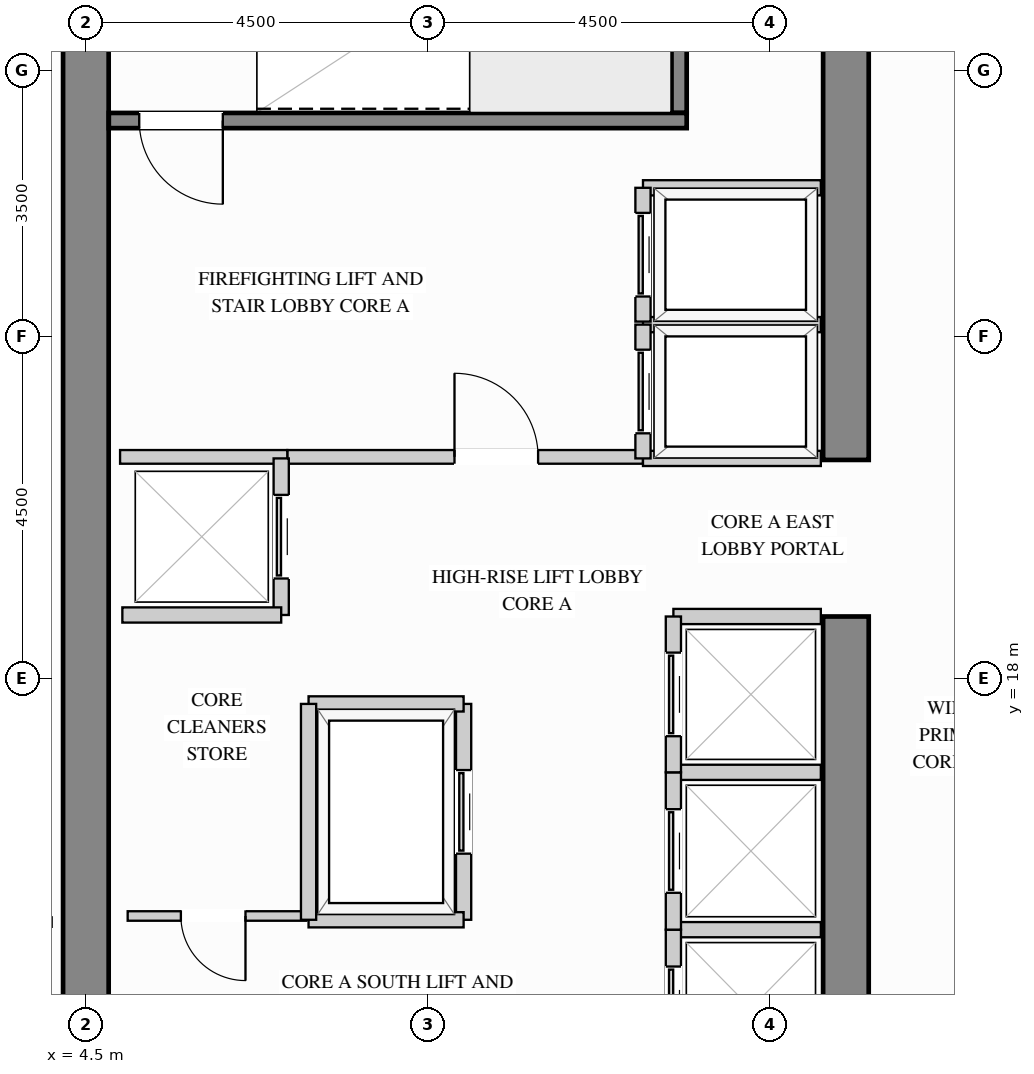
"""IFC4 building model, lengths in metres.
Left out: names, types, materials, properties, quantities, classifications, styles, units other than length and angle.
Written with IfcOpenShell. Run it as: python <this file> out.ifc"""

import sys

from ifc_helpers import new_model, si_unit, direction, frame, frame_2d, origin, place, context, subcontext, project, spatial, rectangle, extrude, source, transform, mapped, element, fill, save


model = new_model("IFC4")
c1 = context("Model", 3, precision=1e-05, world=origin(), true_north=direction((0.0, 1.0)))
c2 = subcontext(c1, "Body", "Model", "MODEL_VIEW")
j1 = project(units=[si_unit("LENGTHUNIT", "METRE"), si_unit("PLANEANGLEUNIT", "RADIAN")], contexts=[c1])
p1 = place(None, origin())
s1 = spatial("IfcSite", under=j1, at=p1, CompositionType="ELEMENT")
p2 = place(p1, origin())
s2 = spatial("IfcBuilding", under=s1, at=p2, CompositionType="ELEMENT")
p3 = place(p2, frame((0.0, 0.0, 200.7)))
s3 = spatial("IfcBuildingStorey", under=s2, at=p3, CompositionType="ELEMENT", Elevation=200.7)
m1 = source(origin(), c2, "Body", "SweptSolid", [
    extrude(rectangle(XDim=10.02, YDim=0.6, at=frame_2d((5.01, 0.0))), origin(), (0.0, 0.0, 1.0), 3.4),
])
p4 = place(p3, frame((14.5, 8.8, 0.0), z_axis=(0.0, 0.0, 1.0), x_axis=(0.0, 1.0, 0.0)))
e1 = element("IfcWall", 1, at=p4, inside=s3, PredefinedType="SHEAR", context=c2, shape_type="MappedRepresentation", body=[
    mapped(m1, transform((0.0, 0.0, 0.0), x_axis=(1.0, 0.0, 0.0), y_axis=(0.0, 1.0, 0.0), z_axis=(0.0, 0.0, 1.0))),
])
m2 = source(origin(), c2, "Body", "SweptSolid", [
    extrude(rectangle(XDim=8.32, YDim=0.6, at=frame_2d((4.16, 0.0))), origin(), (0.0, 0.0, 1.0), 3.4),
])
p5 = place(p3, frame((14.5, 20.88, 0.0), z_axis=(0.0, 0.0, 1.0), x_axis=(0.0, 1.0, 0.0)))
e2 = element("IfcWall", 2, at=p5, inside=s3, PredefinedType="SHEAR", context=c2, shape_type="MappedRepresentation", body=[
    mapped(m2, transform((0.0, 0.0, 0.0), x_axis=(1.0, 0.0, 0.0), y_axis=(0.0, 1.0, 0.0), z_axis=(0.0, 0.0, 1.0))),
])
m3 = source(origin(), c2, "Body", "SweptSolid", [
    extrude(rectangle(XDim=20.4, YDim=0.6, at=frame_2d((10.2, 0.0))), origin(), (0.0, 0.0, 1.0), 3.4),
])
p6 = place(p3, frame((4.5, 8.8, 0.0), z_axis=(0.0, 0.0, 1.0), x_axis=(0.0, 1.0, 0.0)))
e3 = element("IfcWall", 3, at=p6, inside=s3, PredefinedType="SHEAR", context=c2, shape_type="MappedRepresentation", body=[
    mapped(m3, transform((0.0, 0.0, 0.0), x_axis=(1.0, 0.0, 0.0), y_axis=(0.0, 1.0, 0.0), z_axis=(0.0, 0.0, 1.0))),
])
p7 = place(p3, frame((7.15, 20.92, 0.0), z_axis=(0.0, 0.0, 1.0), x_axis=(1.0, 0.0, 0.0)))
e4 = element("IfcWall", 4, at=p7, inside=s3, PredefinedType="PARTITIONING", context=c2, shape_type="SweptSolid", body=[
    extrude(rectangle(XDim=4.68, YDim=0.18, at=frame_2d((2.34, 0.0))), origin(), (0.0, 0.0, 1.0), 3.385),
])
p8 = place(p7, frame((2.2, 0.0, 0.0)))
e5 = element("IfcOpeningElement", 5, at=p8, cuts=e4, PredefinedType="OPENING", context=c2, shape_type="SweptSolid", body=[
    extrude(rectangle(XDim=1.1, YDim=2.15, at=frame_2d((0.55, 1.075))), frame((0.0, 0.1, 0.0), z_axis=(0.0, -1.0, 0.0), x_axis=(1.0, 0.0, 0.0)), (0.0, 0.0, 1.0), 0.2),
])
m4 = source(origin(), c2, "Body", "SweptSolid", [
    extrude(rectangle(XDim=2.2, YDim=0.18, at=frame_2d((1.1, 0.0))), origin(), (0.0, 0.0, 1.0), 3.385),
])
p9 = place(p3, frame((4.95, 20.92, 0.0), z_axis=(0.0, 0.0, 1.0), x_axis=(1.0, 0.0, 0.0)))
e6 = element("IfcWall", 6, at=p9, inside=s3, PredefinedType="PARTITIONING", context=c2, shape_type="MappedRepresentation", body=[
    mapped(m4, transform((0.0, 0.0, 0.0), x_axis=(1.0, 0.0, 0.0), y_axis=(0.0, 1.0, 0.0), z_axis=(0.0, 0.0, 1.0))),
])
p10 = place(p3, frame((5.05, 14.88, 0.0), z_axis=(0.0, 0.0, 1.0), x_axis=(1.0, 0.0, 0.0)))
e7 = element("IfcWall", 7, at=p10, inside=s3, PredefinedType="PARTITIONING", context=c2, shape_type="SweptSolid", body=[
    extrude(rectangle(XDim=2.35, YDim=0.125, at=frame_2d((1.175, 0.0))), origin(), (0.0, 0.0, 1.0), 3.385),
])
p11 = place(p10, frame((0.7, 0.0, 0.0)))
e8 = element("IfcOpeningElement", 8, at=p11, cuts=e7, PredefinedType="OPENING", context=c2, shape_type="SweptSolid", body=[
    extrude(rectangle(XDim=0.85, YDim=2.1, at=frame_2d((0.425, 1.05))), frame((0.0, 0.073, 0.0), z_axis=(0.0, -1.0, 0.0), x_axis=(1.0, 0.0, 0.0)), (0.0, 0.0, 1.0), 0.145),
])
m5 = source(origin(), c2, "Body", "SweptSolid", [
    extrude(rectangle(XDim=3.698, YDim=0.125, at=frame_2d((1.849, 0.0))), origin(), (0.0, 0.0, 1.0), 3.385),
])
p12 = place(p3, frame((0.352, 14.8, 0.0), z_axis=(0.0, 0.0, 1.0), x_axis=(1.0, 0.0, 0.0)))
e9 = element("IfcWall", 9, at=p12, inside=s3, PredefinedType="PARTITIONING", context=c2, shape_type="MappedRepresentation", body=[
    mapped(m5, transform((0.0, 0.0, 0.0), x_axis=(1.0, 0.0, 0.0), y_axis=(0.0, 1.0, 0.0), z_axis=(0.0, 0.0, 1.0))),
])
m6 = source(origin(), c2, "Body", "SweptSolid", [
    extrude(rectangle(XDim=2.34, YDim=0.2, at=frame_2d((1.17, 0.0))), origin(), (0.0, 0.0, 1.0), 3.385),
])
for number, where, z_axis, x_axis in (
    (10, (11.83, 22.66, 0.0), (0.0, 0.0, 1.0), (1.0, 0.0, 0.0)),
    (11, (11.83, 20.9, 0.0), (0.0, 0.0, 1.0), (1.0, 0.0, 0.0)),
):
    element("IfcWall", number, at=place(p3, frame(where, z_axis=z_axis, x_axis=x_axis)), inside=s3, PredefinedType="PARTITIONING", context=c2, shape_type="MappedRepresentation", body=[
        mapped(m6, transform((0.0, 0.0, 0.0), x_axis=(1.0, 0.0, 0.0), y_axis=(0.0, 1.0, 0.0), z_axis=(0.0, 0.0, 1.0))),
    ])
p13 = place(p3, frame((11.83, 20.9, 0.0), z_axis=(0.0, 0.0, 1.0), x_axis=(0.0, 1.0, 0.0)))
e12 = element("IfcWall", 12, at=p13, inside=s3, PredefinedType="PARTITIONING", context=c2, shape_type="SweptSolid", body=[
    extrude(rectangle(XDim=1.76, YDim=0.2, at=frame_2d((0.88, 0.0))), origin(), (0.0, 0.0, 1.0), 3.385),
])
p14 = place(p13, frame((0.33, 0.0, 0.0)))
e13 = element("IfcOpeningElement", 13, at=p14, cuts=e12, PredefinedType="OPENING", context=c2, shape_type="SweptSolid", body=[
    extrude(rectangle(XDim=1.1, YDim=2.2, at=frame_2d((0.55, 1.1))), frame((0.0, 0.11, 0.0), z_axis=(0.0, -1.0, 0.0), x_axis=(1.0, 0.0, 0.0)), (0.0, 0.0, 1.0), 0.22),
])
p15 = place(p3, frame((11.83, 24.46, 0.0), z_axis=(0.0, 0.0, 1.0), x_axis=(1.0, 0.0, 0.0)))
e14 = element("IfcWall", 14, at=p15, inside=s3, PredefinedType="PARTITIONING", context=c2, shape_type="MappedRepresentation", body=[
    mapped(m6, transform((0.0, 0.0, 0.0), x_axis=(1.0, 0.0, 0.0), y_axis=(0.0, 1.0, 0.0), z_axis=(0.0, 0.0, 1.0))),
])
p16 = place(p3, frame((11.83, 22.7, 0.0), z_axis=(0.0, 0.0, 1.0), x_axis=(0.0, 1.0, 0.0)))
e15 = element("IfcWall", 15, at=p16, inside=s3, PredefinedType="PARTITIONING", context=c2, shape_type="SweptSolid", body=[
    extrude(rectangle(XDim=1.76, YDim=0.2, at=frame_2d((0.88, 0.0))), origin(), (0.0, 0.0, 1.0), 3.385),
])
p17 = place(p16, frame((0.33, 0.0, 0.0)))
e16 = element("IfcOpeningElement", 16, at=p17, cuts=e15, PredefinedType="OPENING", context=c2, shape_type="SweptSolid", body=[
    extrude(rectangle(XDim=1.1, YDim=2.2, at=frame_2d((0.55, 1.1))), frame((0.0, 0.11, 0.0), z_axis=(0.0, -1.0, 0.0), x_axis=(1.0, 0.0, 0.0)), (0.0, 0.0, 1.0), 0.22),
])
m7 = source(origin(), c2, "Body", "SweptSolid", [
    extrude(rectangle(XDim=1.94, YDim=0.2, at=frame_2d((0.97, 0.0))), origin(), (0.0, 0.0, 1.0), 3.385),
])
p18 = place(p3, frame((12.23, 14.7, 0.0), z_axis=(0.0, 0.0, 1.0), x_axis=(1.0, 0.0, 0.0)))
e17 = element("IfcWall", 17, at=p18, inside=s3, PredefinedType="PARTITIONING", context=c2, shape_type="MappedRepresentation", body=[
    mapped(m7, transform((0.0, 0.0, 0.0), x_axis=(1.0, 0.0, 0.0), y_axis=(0.0, 1.0, 0.0), z_axis=(0.0, 0.0, 1.0))),
])
p19 = place(p3, frame((12.23, 12.63, 0.0), z_axis=(0.0, 0.0, 1.0), x_axis=(0.0, 1.0, 0.0)))
e18 = element("IfcWall", 18, at=p19, inside=s3, PredefinedType="PARTITIONING", context=c2, shape_type="SweptSolid", body=[
    extrude(rectangle(XDim=2.07, YDim=0.2, at=frame_2d((1.035, 0.0))), origin(), (0.0, 0.0, 1.0), 3.385),
])
p20 = place(p19, frame((0.485, 0.0, 0.0)))
e19 = element("IfcOpeningElement", 19, at=p20, cuts=e18, PredefinedType="OPENING", context=c2, shape_type="SweptSolid", body=[
    extrude(rectangle(XDim=1.1, YDim=2.2, at=frame_2d((0.55, 1.1))), frame((0.0, 0.11, 0.0), z_axis=(0.0, -1.0, 0.0), x_axis=(1.0, 0.0, 0.0)), (0.0, 0.0, 1.0), 0.22),
])
p21 = place(p3, frame((12.23, 16.77, 0.0), z_axis=(0.0, 0.0, 1.0), x_axis=(1.0, 0.0, 0.0)))
e20 = element("IfcWall", 20, at=p21, inside=s3, PredefinedType="PARTITIONING", context=c2, shape_type="MappedRepresentation", body=[
    mapped(m7, transform((0.0, 0.0, 0.0), x_axis=(1.0, 0.0, 0.0), y_axis=(0.0, 1.0, 0.0), z_axis=(0.0, 0.0, 1.0))),
])
p22 = place(p3, frame((12.23, 14.7, 0.0), z_axis=(0.0, 0.0, 1.0), x_axis=(0.0, 1.0, 0.0)))
e21 = element("IfcWall", 21, at=p22, inside=s3, PredefinedType="PARTITIONING", context=c2, shape_type="SweptSolid", body=[
    extrude(rectangle(XDim=2.07, YDim=0.2, at=frame_2d((1.035, 0.0))), origin(), (0.0, 0.0, 1.0), 3.385),
])
p23 = place(p22, frame((0.485, 0.0, 0.0)))
e22 = element("IfcOpeningElement", 22, at=p23, cuts=e21, PredefinedType="OPENING", context=c2, shape_type="SweptSolid", body=[
    extrude(rectangle(XDim=1.1, YDim=2.2, at=frame_2d((0.55, 1.1))), frame((0.0, 0.11, 0.0), z_axis=(0.0, -1.0, 0.0), x_axis=(1.0, 0.0, 0.0)), (0.0, 0.0, 1.0), 0.22),
])
p24 = place(p3, frame((12.23, 18.82, 0.0), z_axis=(0.0, 0.0, 1.0), x_axis=(1.0, 0.0, 0.0)))
e23 = element("IfcWall", 23, at=p24, inside=s3, PredefinedType="PARTITIONING", context=c2, shape_type="MappedRepresentation", body=[
    mapped(m7, transform((0.0, 0.0, 0.0), x_axis=(1.0, 0.0, 0.0), y_axis=(0.0, 1.0, 0.0), z_axis=(0.0, 0.0, 1.0))),
])
p25 = place(p3, frame((12.23, 16.77, 0.0), z_axis=(0.0, 0.0, 1.0), x_axis=(0.0, 1.0, 0.0)))
e24 = element("IfcWall", 24, at=p25, inside=s3, PredefinedType="PARTITIONING", context=c2, shape_type="SweptSolid", body=[
    extrude(rectangle(XDim=2.05, YDim=0.2, at=frame_2d((1.025, 0.0))), origin(), (0.0, 0.0, 1.0), 3.385),
])
p26 = place(p25, frame((0.475, 0.0, 0.0)))
e25 = element("IfcOpeningElement", 25, at=p26, cuts=e24, PredefinedType="OPENING", context=c2, shape_type="SweptSolid", body=[
    extrude(rectangle(XDim=1.1, YDim=2.2, at=frame_2d((0.55, 1.1))), frame((0.0, 0.11, 0.0), z_axis=(0.0, -1.0, 0.0), x_axis=(1.0, 0.0, 0.0)), (0.0, 0.0, 1.0), 0.22),
])
p27 = place(p3, frame((7.07, 18.84, 0.0), z_axis=(0.0, 0.0, 1.0), x_axis=(0.0, 1.0, 0.0)))
e26 = element("IfcWall", 26, at=p27, inside=s3, PredefinedType="PARTITIONING", context=c2, shape_type="SweptSolid", body=[
    extrude(rectangle(XDim=2.06, YDim=0.2, at=frame_2d((1.03, 0.0))), origin(), (0.0, 0.0, 1.0), 3.385),
])
p28 = place(p27, frame((0.48, 0.0, 0.0)))
e27 = element("IfcOpeningElement", 27, at=p28, cuts=e26, PredefinedType="OPENING", context=c2, shape_type="SweptSolid", body=[
    extrude(rectangle(XDim=1.1, YDim=2.2, at=frame_2d((0.55, 1.1))), frame((0.0, 0.11, 0.0), z_axis=(0.0, -1.0, 0.0), x_axis=(1.0, 0.0, 0.0)), (0.0, 0.0, 1.0), 0.22),
])
m8 = source(origin(), c2, "Body", "SweptSolid", [
    extrude(rectangle(XDim=2.09, YDim=0.2, at=frame_2d((1.045, 0.0))), origin(), (0.0, 0.0, 1.0), 3.385),
])
p29 = place(p3, frame((4.98, 18.84, 0.0), z_axis=(0.0, 0.0, 1.0), x_axis=(1.0, 0.0, 0.0)))
e28 = element("IfcWall", 28, at=p29, inside=s3, PredefinedType="PARTITIONING", context=c2, shape_type="MappedRepresentation", body=[
    mapped(m8, transform((0.0, 0.0, 0.0), x_axis=(1.0, 0.0, 0.0), y_axis=(0.0, 1.0, 0.0), z_axis=(0.0, 0.0, 1.0))),
])
p30 = place(p3, frame((9.47, 14.83, 0.0), z_axis=(0.0, 0.0, 1.0), x_axis=(0.0, 1.0, 0.0)))
e29 = element("IfcWall", 29, at=p30, inside=s3, PredefinedType="PARTITIONING", context=c2, shape_type="SweptSolid", body=[
    extrude(rectangle(XDim=2.84, YDim=0.2, at=frame_2d((1.42, 0.0))), origin(), (0.0, 0.0, 1.0), 3.385),
])
p31 = place(p30, frame((0.87, 0.0, 0.0)))
e30 = element("IfcOpeningElement", 30, at=p31, cuts=e29, PredefinedType="OPENING", context=c2, shape_type="SweptSolid", body=[
    extrude(rectangle(XDim=1.1, YDim=2.2, at=frame_2d((0.55, 1.1))), frame((0.0, 0.11, 0.0), z_axis=(0.0, -1.0, 0.0), x_axis=(1.0, 0.0, 0.0)), (0.0, 0.0, 1.0), 0.22),
])
m9 = source(origin(), c2, "Body", "SweptSolid", [
    extrude(rectangle(XDim=2.04, YDim=0.2, at=frame_2d((1.02, 0.0))), origin(), (0.0, 0.0, 1.0), 3.385),
])
for number, where, z_axis, x_axis in (
    (31, (7.43, 17.67, 0.0), (0.0, 0.0, 1.0), (1.0, 0.0, 0.0)),
    (32, (7.43, 14.83, 0.0), (0.0, 0.0, 1.0), (1.0, 0.0, 0.0)),
):
    element("IfcWall", number, at=place(p3, frame(where, z_axis=z_axis, x_axis=x_axis)), inside=s3, PredefinedType="PARTITIONING", context=c2, shape_type="MappedRepresentation", body=[
        mapped(m9, transform((0.0, 0.0, 0.0), x_axis=(1.0, 0.0, 0.0), y_axis=(0.0, 1.0, 0.0), z_axis=(0.0, 0.0, 1.0))),
    ])
m10 = source(origin(), c2, "Body", "SweptSolid", [
    extrude(rectangle(XDim=2.84, YDim=0.2, at=frame_2d((1.42, 0.0))), origin(), (0.0, 0.0, 1.0), 3.385),
])
p32 = place(p3, frame((7.43, 14.83, 0.0), z_axis=(0.0, 0.0, 1.0), x_axis=(0.0, 1.0, 0.0)))
e33 = element("IfcWall", 33, at=p32, inside=s3, PredefinedType="PARTITIONING", context=c2, shape_type="MappedRepresentation", body=[
    mapped(m10, transform((0.0, 0.0, 0.0), x_axis=(1.0, 0.0, 0.0), y_axis=(0.0, 1.0, 0.0), z_axis=(0.0, 0.0, 1.0))),
])
m11 = source(origin(), c2, "Body", "SweptSolid", [
    extrude(rectangle(XDim=3.753, YDim=0.2, at=frame_2d((1.876, 0.0))), origin(), (0.0, 0.0, 1.0), 3.4),
])
p33 = place(p3, frame((12.305, 25.445, 0.0), z_axis=(0.0, 0.0, 1.0), x_axis=(0.0, 1.0, 0.0)))
e34 = element("IfcWall", 34, at=p33, inside=s3, PredefinedType="SHEAR", context=c2, shape_type="MappedRepresentation", body=[
    mapped(m11, transform((0.0, 0.0, 0.0), x_axis=(1.0, 0.0, 0.0), y_axis=(0.0, 1.0, 0.0), z_axis=(0.0, 0.0, 1.0))),
])
p34 = place(p3, frame((4.802, 25.345, 0.0), z_axis=(0.0, 0.0, 1.0), x_axis=(1.0, 0.0, 0.0)))
e35 = element("IfcWall", 35, at=p34, inside=s3, PredefinedType="SHEAR", context=c2, shape_type="SweptSolid", body=[
    extrude(rectangle(XDim=7.603, YDim=0.2, at=frame_2d((3.802, 0.0))), origin(), (0.0, 0.0, 1.0), 3.4),
])
p35 = place(p34, frame((0.4, 0.0, 0.0)))
e36 = element("IfcOpeningElement", 36, at=p35, cuts=e35, PredefinedType="OPENING", context=c2, shape_type="SweptSolid", body=[
    extrude(rectangle(XDim=1.1, YDim=2.15, at=frame_2d((0.55, 1.075))), frame((0.0, 0.11, 0.0), z_axis=(0.0, -1.0, 0.0), x_axis=(1.0, 0.0, 0.0)), (0.0, 0.0, 1.0), 0.22),
])
m12 = source(origin(), c2, "Body", "SweptSolid", [
    extrude(rectangle(XDim=1.1, YDim=2.15, at=frame_2d((0.55, 1.075))), frame((0.0, 0.025, 0.0), z_axis=(0.0, -1.0, 0.0), x_axis=(1.0, 0.0, 0.0)), (0.0, 0.0, 1.0), 0.05),
])
p36 = place(p8, origin())
e37 = element("IfcDoor", 37, at=p36, inside=s3, OperationType="SINGLE_SWING_LEFT", PredefinedType="DOOR", context=c2, shape_type="MappedRepresentation", body=[
    mapped(m12, transform((0.0, 0.0, 0.0), x_axis=(1.0, 0.0, 0.0), y_axis=(0.0, 1.0, 0.0), z_axis=(0.0, 0.0, 1.0))),
])
fill(e5, e37)
m13 = source(origin(), c2, "Body", "SweptSolid", [
    extrude(rectangle(XDim=1.1, YDim=2.2, at=frame_2d((0.55, 1.1))), frame((0.0, 0.025, 0.0), z_axis=(0.0, -1.0, 0.0), x_axis=(1.0, 0.0, 0.0)), (0.0, 0.0, 1.0), 0.05),
])
p37 = place(p14, origin())
e38 = element("IfcDoor", 38, at=p37, inside=s3, OperationType="SLIDING_TO_LEFT", PredefinedType="DOOR", context=c2, shape_type="MappedRepresentation", body=[
    mapped(m13, transform((0.0, 0.0, 0.0), x_axis=(1.0, 0.0, 0.0), y_axis=(0.0, 1.0, 0.0), z_axis=(0.0, 0.0, 1.0))),
])
fill(e13, e38)
p38 = place(p17, origin())
e39 = element("IfcDoor", 39, at=p38, inside=s3, OperationType="SLIDING_TO_LEFT", PredefinedType="DOOR", context=c2, shape_type="MappedRepresentation", body=[
    mapped(m13, transform((0.0, 0.0, 0.0), x_axis=(1.0, 0.0, 0.0), y_axis=(0.0, 1.0, 0.0), z_axis=(0.0, 0.0, 1.0))),
])
fill(e16, e39)
p39 = place(p20, origin())
e40 = element("IfcDoor", 40, at=p39, inside=s3, OperationType="SLIDING_TO_LEFT", PredefinedType="DOOR", context=c2, shape_type="MappedRepresentation", body=[
    mapped(m13, transform((0.0, 0.0, 0.0), x_axis=(1.0, 0.0, 0.0), y_axis=(0.0, 1.0, 0.0), z_axis=(0.0, 0.0, 1.0))),
])
fill(e19, e40)
p40 = place(p23, origin())
e41 = element("IfcDoor", 41, at=p40, inside=s3, OperationType="SLIDING_TO_LEFT", PredefinedType="DOOR", context=c2, shape_type="MappedRepresentation", body=[
    mapped(m13, transform((0.0, 0.0, 0.0), x_axis=(1.0, 0.0, 0.0), y_axis=(0.0, 1.0, 0.0), z_axis=(0.0, 0.0, 1.0))),
])
fill(e22, e41)
p41 = place(p26, origin())
e42 = element("IfcDoor", 42, at=p41, inside=s3, OperationType="SLIDING_TO_LEFT", PredefinedType="DOOR", context=c2, shape_type="MappedRepresentation", body=[
    mapped(m13, transform((0.0, 0.0, 0.0), x_axis=(1.0, 0.0, 0.0), y_axis=(0.0, 1.0, 0.0), z_axis=(0.0, 0.0, 1.0))),
])
fill(e25, e42)
p42 = place(p28, origin())
e43 = element("IfcDoor", 43, at=p42, inside=s3, OperationType="SLIDING_TO_LEFT", PredefinedType="DOOR", context=c2, shape_type="MappedRepresentation", body=[
    mapped(m13, transform((0.0, 0.0, 0.0), x_axis=(1.0, 0.0, 0.0), y_axis=(0.0, 1.0, 0.0), z_axis=(0.0, 0.0, 1.0))),
])
fill(e27, e43)
p43 = place(p31, origin())
e44 = element("IfcDoor", 44, at=p43, inside=s3, OperationType="SLIDING_TO_LEFT", PredefinedType="DOOR", context=c2, shape_type="MappedRepresentation", body=[
    mapped(m13, transform((0.0, 0.0, 0.0), x_axis=(1.0, 0.0, 0.0), y_axis=(0.0, 1.0, 0.0), z_axis=(0.0, 0.0, 1.0))),
])
fill(e30, e44)
m14 = source(origin(), c2, "Body", "SweptSolid", [
    extrude(rectangle(XDim=0.85, YDim=2.1, at=frame_2d((0.425, 1.05))), frame((0.0, 0.025, 0.0), z_axis=(0.0, -1.0, 0.0), x_axis=(1.0, 0.0, 0.0)), (0.0, 0.0, 1.0), 0.05),
])
p44 = place(p11, origin())
e45 = element("IfcDoor", 45, at=p44, inside=s3, OperationType="SINGLE_SWING_RIGHT", PredefinedType="DOOR", context=c2, shape_type="MappedRepresentation", body=[
    mapped(m14, transform((0.0, 0.0, 0.0), x_axis=(1.0, 0.0, 0.0), y_axis=(0.0, 1.0, 0.0), z_axis=(0.0, 0.0, 1.0))),
])
fill(e8, e45)
m15 = source(origin(), c2, "Body", "SweptSolid", [
    extrude(rectangle(XDim=1.1, YDim=2.15, at=frame_2d((0.55, 1.075))), frame((0.0, 0.025, 0.0), z_axis=(0.0, -1.0, 0.0), x_axis=(1.0, 0.0, 0.0)), (0.0, 0.0, 1.0), 0.05),
])
p45 = place(p35, origin())
e46 = element("IfcDoor", 46, at=p45, inside=s3, OperationType="SINGLE_SWING_RIGHT", PredefinedType="DOOR", context=c2, shape_type="MappedRepresentation", body=[
    mapped(m15, transform((0.0, 0.0, 0.0), x_axis=(1.0, 0.0, 0.0), y_axis=(0.0, 1.0, 0.0), z_axis=(0.0, 0.0, 1.0))),
])
fill(e36, e46)
save(model, sys.argv[1])
